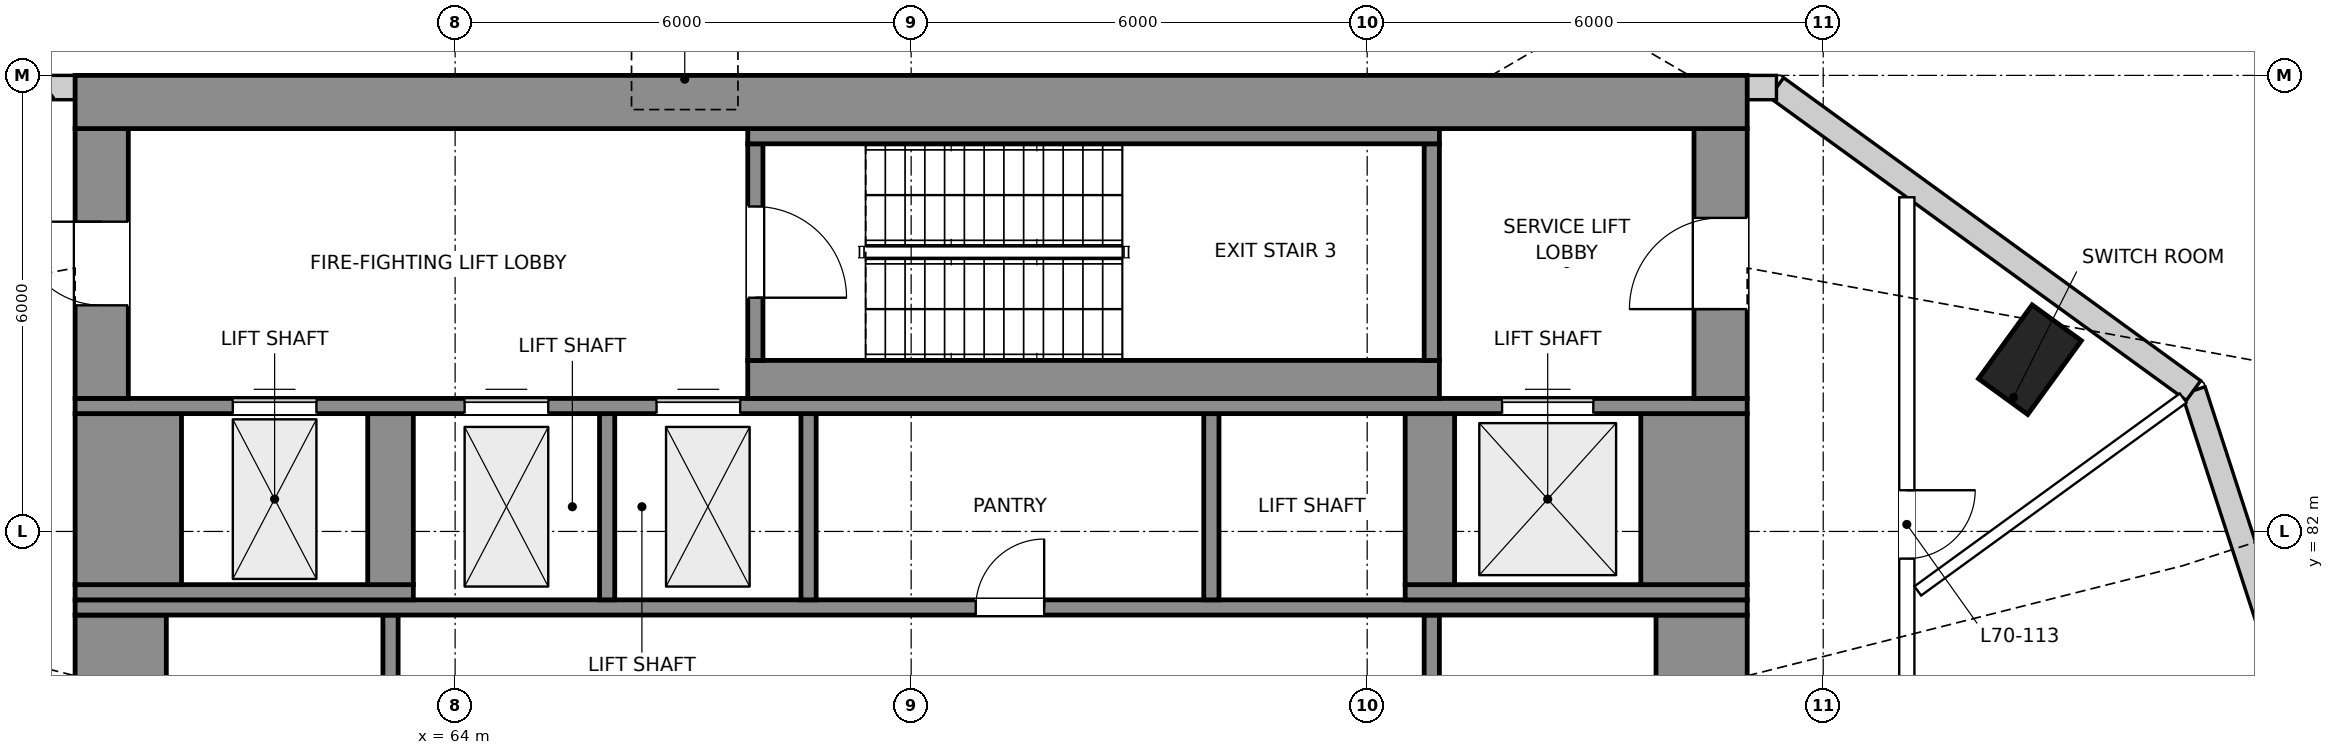
"""IFC4 building model, lengths in metres.
Left out: names, types, materials, properties, quantities, classifications, styles, units other than length and angle.
Written with IfcOpenShell. Run it as: python <this file> out.ifc"""

import sys

from ifc_helpers import new_model, si_unit, direction, frame, frame_2d, origin, origin_2d, place, context, subcontext, project, spatial, rectangle, extrude, element, fill, save


model = new_model("IFC4")
c1 = context("Model", 3, precision=1e-05, world=origin(), true_north=direction((0.0, 1.0)))
c2 = subcontext(c1, "Body", "Model", "MODEL_VIEW")
j1 = project(units=[si_unit("LENGTHUNIT", "METRE"), si_unit("PLANEANGLEUNIT", "RADIAN")], contexts=[c1])
p1 = place(None, origin())
s1 = spatial("IfcSite", under=j1, at=p1, CompositionType="ELEMENT")
p2 = place(p1, origin())
s2 = spatial("IfcBuilding", under=s1, at=p2, CompositionType="ELEMENT")
p3 = place(p2, frame((0.0, 0.0, 295.1)))
s3 = spatial("IfcBuildingStorey", under=s2, at=p3, CompositionType="ELEMENT", Elevation=295.1)
p4 = place(p3, frame((84.72, 84.26, 0.0), z_axis=(0.0, 0.0, 1.0), x_axis=(0.80902725304, -0.587771132193, 0.0)))
e1 = element("IfcColumn", 1, at=p4, inside=s3, PredefinedType="COLUMN", context=c2, shape_type="SweptSolid", body=[
    extrude(rectangle(XDim=0.8, YDim=1.2, at=origin_2d()), origin(), (0.0, 0.0, 1.0), 5.0),
])
p5 = place(p3, frame((92.529, 66.443, 0.0), z_axis=(0.0, 0.0, 1.0), x_axis=(-0.30902093442, 0.951055236088, 0.0)))
e2 = element("IfcWall", 2, at=p5, inside=s3, PredefinedType="SOLIDWALL", context=c2, shape_type="SweptSolid", body=[
    extrude(rectangle(XDim=18.306, YDim=0.32, at=frame_2d((9.153, 0.0))), origin(), (0.0, 0.0, 1.0), 4.6),
])
p6 = place(p3, frame((86.872, 83.854, 0.0), z_axis=(0.0, 0.0, 1.0), x_axis=(-0.809017735842, 0.587784231749, 0.0)))
e3 = element("IfcWall", 3, at=p6, inside=s3, PredefinedType="SOLIDWALL", context=c2, shape_type="SweptSolid", body=[
    extrude(rectangle(XDim=6.782, YDim=0.32, at=frame_2d((3.391, 0.0))), origin(), (0.0, 0.0, 1.0), 4.6),
])
for number, where, z_axis, x_axis in (
    (4, (81.385, 87.84, 0.0), (0.0, 0.0, 1.0), (-1.0, 0.0, 0.0)),
    (5, (59.0, 87.84, 0.0), (0.0, 0.0, 1.0), (-1.0, 0.0, 0.0)),
):
    element("IfcWall", number, at=place(p3, frame(where, z_axis=z_axis, x_axis=x_axis)), inside=s3, PredefinedType="SOLIDWALL", context=c2, shape_type="SweptSolid", body=[
        extrude(rectangle(XDim=0.385, YDim=0.32, at=frame_2d((0.192, 0.0))), origin(), (0.0, 0.0, 1.0), 4.6),
    ])
p7 = place(p3, frame((58.615, 87.84, 0.0), z_axis=(0.0, 0.0, 1.0), x_axis=(-0.809017735842, -0.587784231749, 0.0)))
e6 = element("IfcWall", 6, at=p7, inside=s3, PredefinedType="SOLIDWALL", context=c2, shape_type="SweptSolid", body=[
    extrude(rectangle(XDim=6.782, YDim=0.32, at=frame_2d((3.391, 0.0))), origin(), (0.0, 0.0, 1.0), 4.6),
])
for number, where, z_axis, x_axis in (
    (7, (59.6, 71.7, 0.0), (0.0, 0.0, 1.0), (0.0, 1.0, 0.0)),
    (8, (80.4, 71.7, 0.0), (0.0, 0.0, 1.0), (0.0, 1.0, 0.0)),
):
    element("IfcWall", number, at=place(p3, frame(where, z_axis=z_axis, x_axis=x_axis)), inside=s3, PredefinedType="SHEAR", context=c2, shape_type="SweptSolid", body=[
        extrude(rectangle(XDim=9.2, YDim=1.2, at=frame_2d((4.6, 0.0))), origin(), (0.0, 0.0, 1.0), 5.0),
    ])
for number, where, z_axis, x_axis in (
    (9, (63.15, 77.7, 0.0), (0.0, 0.0, 1.0), (0.0, 1.0, 0.0)),
    (10, (76.85, 77.7, 0.0), (0.0, 0.0, 1.0), (0.0, 1.0, 0.0)),
):
    element("IfcWall", number, at=place(p3, frame(where, z_axis=z_axis, x_axis=x_axis)), inside=s3, PredefinedType="SHEAR", context=c2, shape_type="SweptSolid", body=[
        extrude(rectangle(XDim=3.2, YDim=0.2, at=frame_2d((1.6, 0.0))), origin(), (0.0, 0.0, 1.0), 5.0),
    ])
p8 = place(p3, frame((59.0, 81.0, 0.0), z_axis=(0.0, 0.0, 1.0), x_axis=(1.0, 0.0, 0.0)))
e11 = element("IfcWall", 11, at=p8, inside=s3, PredefinedType="SHEAR", context=c2, shape_type="SweptSolid", body=[
    extrude(rectangle(XDim=22.0, YDim=0.2, at=frame_2d((11.0, 0.0))), origin(), (0.0, 0.0, 1.0), 5.0),
])
p9 = place(p8, frame((11.85, 0.0, 0.0)))
e12 = element("IfcOpeningElement", 12, at=p9, cuts=e11, PredefinedType="OPENING", context=c2, shape_type="SweptSolid", body=[
    extrude(rectangle(XDim=0.9, YDim=2.1, at=frame_2d((0.45, 1.05))), frame((0.0, 0.11, 0.0), z_axis=(0.0, -1.0, 0.0), x_axis=(1.0, 0.0, 0.0)), (0.0, 0.0, 1.0), 0.22),
])
p10 = place(p3, frame((59.0, 81.2, 0.0), z_axis=(0.0, 0.0, 1.0), x_axis=(1.0, 0.0, 0.0)))
e13 = element("IfcWall", 13, at=p10, inside=s3, PredefinedType="SHEAR", context=c2, shape_type="SweptSolid", body=[
    extrude(rectangle(XDim=4.45, YDim=0.2, at=frame_2d((2.225, 0.0))), origin(), (0.0, 0.0, 1.0), 5.0),
])
for number, where, z_axis, x_axis in (
    (14, (66.0, 81.1, 0.0), (0.0, 0.0, 1.0), (0.0, 1.0, 0.0)),
    (15, (68.65, 81.1, 0.0), (0.0, 0.0, 1.0), (0.0, 1.0, 0.0)),
    (16, (73.95, 81.1, 0.0), (0.0, 0.0, 1.0), (0.0, 1.0, 0.0)),
):
    element("IfcWall", number, at=place(p3, frame(where, z_axis=z_axis, x_axis=x_axis)), inside=s3, PredefinedType="SHEAR", context=c2, shape_type="SweptSolid", body=[
        extrude(rectangle(XDim=2.45, YDim=0.2, at=frame_2d((1.225, 0.0))), origin(), (0.0, 0.0, 1.0), 5.0),
    ])
p11 = place(p3, frame((76.5, 81.2, 0.0), z_axis=(0.0, 0.0, 1.0), x_axis=(1.0, 0.0, 0.0)))
e17 = element("IfcWall", 17, at=p11, inside=s3, PredefinedType="SHEAR", context=c2, shape_type="SweptSolid", body=[
    extrude(rectangle(XDim=4.5, YDim=0.2, at=frame_2d((2.25, 0.0))), origin(), (0.0, 0.0, 1.0), 5.0),
])
p12 = place(p3, frame((59.7, 81.3, 0.0), z_axis=(0.0, 0.0, 1.0), x_axis=(0.0, 1.0, 0.0)))
e18 = element("IfcWall", 18, at=p12, inside=s3, PredefinedType="SHEAR", context=c2, shape_type="SweptSolid", body=[
    extrude(rectangle(XDim=2.25, YDim=1.4, at=frame_2d((1.125, 0.0))), origin(), (0.0, 0.0, 1.0), 5.0),
])
p13 = place(p3, frame((63.15, 81.3, 0.0), z_axis=(0.0, 0.0, 1.0), x_axis=(0.0, 1.0, 0.0)))
e19 = element("IfcWall", 19, at=p13, inside=s3, PredefinedType="SHEAR", context=c2, shape_type="SweptSolid", body=[
    extrude(rectangle(XDim=2.25, YDim=0.6, at=frame_2d((1.125, 0.0))), origin(), (0.0, 0.0, 1.0), 5.0),
])
p14 = place(p3, frame((76.825, 81.3, 0.0), z_axis=(0.0, 0.0, 1.0), x_axis=(0.0, 1.0, 0.0)))
e20 = element("IfcWall", 20, at=p14, inside=s3, PredefinedType="SHEAR", context=c2, shape_type="SweptSolid", body=[
    extrude(rectangle(XDim=2.25, YDim=0.65, at=frame_2d((1.125, 0.0))), origin(), (0.0, 0.0, 1.0), 5.0),
])
p15 = place(p3, frame((80.3, 81.3, 0.0), z_axis=(0.0, 0.0, 1.0), x_axis=(0.0, 1.0, 0.0)))
e21 = element("IfcWall", 21, at=p15, inside=s3, PredefinedType="SHEAR", context=c2, shape_type="SweptSolid", body=[
    extrude(rectangle(XDim=2.25, YDim=1.4, at=frame_2d((1.125, 0.0))), origin(), (0.0, 0.0, 1.0), 5.0),
])
p16 = place(p3, frame((59.0, 83.65, 0.0), z_axis=(0.0, 0.0, 1.0), x_axis=(1.0, 0.0, 0.0)))
e22 = element("IfcWall", 22, at=p16, inside=s3, PredefinedType="SHEAR", context=c2, shape_type="SweptSolid", body=[
    extrude(rectangle(XDim=22.0, YDim=0.2, at=frame_2d((11.0, 0.0))), origin(), (0.0, 0.0, 1.0), 5.0),
])
p17 = place(p16, frame((5.125, 0.0, 0.0)))
e23 = element("IfcOpeningElement", 23, at=p17, cuts=e22, PredefinedType="OPENING", context=c2, shape_type="SweptSolid", body=[
    extrude(rectangle(XDim=1.1, YDim=2.1, at=frame_2d((0.55, 1.05))), frame((0.0, 0.11, 0.0), z_axis=(0.0, -1.0, 0.0), x_axis=(1.0, 0.0, 0.0)), (0.0, 0.0, 1.0), 0.22),
])
p18 = place(p16, frame((7.65, 0.0, 0.0)))
e24 = element("IfcOpeningElement", 24, at=p18, cuts=e22, PredefinedType="OPENING", context=c2, shape_type="SweptSolid", body=[
    extrude(rectangle(XDim=1.1, YDim=2.1, at=frame_2d((0.55, 1.05))), frame((0.0, 0.11, 0.0), z_axis=(0.0, -1.0, 0.0), x_axis=(1.0, 0.0, 0.0)), (0.0, 0.0, 1.0), 0.22),
])
p19 = place(p16, frame((18.775, 0.0, 0.0)))
e25 = element("IfcOpeningElement", 25, at=p19, cuts=e22, PredefinedType="OPENING", context=c2, shape_type="SweptSolid", body=[
    extrude(rectangle(XDim=1.2, YDim=2.1, at=frame_2d((0.6, 1.05))), frame((0.0, 0.11, 0.0), z_axis=(0.0, -1.0, 0.0), x_axis=(1.0, 0.0, 0.0)), (0.0, 0.0, 1.0), 0.22),
])
p20 = place(p16, frame((2.075, 0.0, 0.0)))
e26 = element("IfcOpeningElement", 26, at=p20, cuts=e22, PredefinedType="OPENING", context=c2, shape_type="SweptSolid", body=[
    extrude(rectangle(XDim=1.1, YDim=2.1, at=frame_2d((0.55, 1.05))), frame((0.0, 0.11, 0.0), z_axis=(0.0, -1.0, 0.0), x_axis=(1.0, 0.0, 0.0)), (0.0, 0.0, 1.0), 0.22),
])
p21 = place(p3, frame((59.35, 83.75, 0.0), z_axis=(0.0, 0.0, 1.0), x_axis=(0.0, 1.0, 0.0)))
e27 = element("IfcWall", 27, at=p21, inside=s3, PredefinedType="SHEAR", context=c2, shape_type="SweptSolid", body=[
    extrude(rectangle(XDim=3.55, YDim=0.7, at=frame_2d((1.775, 0.0))), origin(), (0.0, 0.0, 1.0), 5.0),
])
p22 = place(p21, frame((1.225, 0.0, 0.0)))
e28 = element("IfcOpeningElement", 28, at=p22, cuts=e27, PredefinedType="OPENING", context=c2, shape_type="SweptSolid", body=[
    extrude(rectangle(XDim=1.1, YDim=2.1, at=frame_2d((0.55, 1.05))), frame((0.0, 0.36, 0.0), z_axis=(0.0, -1.0, 0.0), x_axis=(1.0, 0.0, 0.0)), (0.0, 0.0, 1.0), 0.72),
])
p23 = place(p3, frame((67.85, 84.0, 0.0), z_axis=(0.0, 0.0, 1.0), x_axis=(1.0, 0.0, 0.0)))
e29 = element("IfcWall", 29, at=p23, inside=s3, PredefinedType="SHEAR", context=c2, shape_type="SweptSolid", body=[
    extrude(rectangle(XDim=9.1, YDim=0.5, at=frame_2d((4.55, 0.0))), origin(), (0.0, 0.0, 1.0), 5.0),
])
p24 = place(p3, frame((80.65, 83.75, 0.0), z_axis=(0.0, 0.0, 1.0), x_axis=(0.0, 1.0, 0.0)))
e30 = element("IfcWall", 30, at=p24, inside=s3, PredefinedType="SHEAR", context=c2, shape_type="SweptSolid", body=[
    extrude(rectangle(XDim=3.55, YDim=0.7, at=frame_2d((1.775, 0.0))), origin(), (0.0, 0.0, 1.0), 5.0),
])
p25 = place(p24, frame((1.175, 0.0, 0.0)))
e31 = element("IfcOpeningElement", 31, at=p25, cuts=e30, PredefinedType="OPENING", context=c2, shape_type="SweptSolid", body=[
    extrude(rectangle(XDim=1.2, YDim=2.1, at=frame_2d((0.6, 1.05))), frame((0.0, 0.36, 0.0), z_axis=(0.0, -1.0, 0.0), x_axis=(1.0, 0.0, 0.0)), (0.0, 0.0, 1.0), 0.72),
])
p26 = place(p3, frame((67.95, 84.25, 0.0), z_axis=(0.0, 0.0, 1.0), x_axis=(0.0, 1.0, 0.0)))
e32 = element("IfcWall", 32, at=p26, inside=s3, PredefinedType="SHEAR", context=c2, shape_type="SweptSolid", body=[
    extrude(rectangle(XDim=2.85, YDim=0.2, at=frame_2d((1.425, 0.0))), origin(), (0.0, 0.0, 1.0), 5.0),
])
p27 = place(p26, frame((0.825, 0.0, 0.0)))
e33 = element("IfcOpeningElement", 33, at=p27, cuts=e32, PredefinedType="OPENING", context=c2, shape_type="SweptSolid", body=[
    extrude(rectangle(XDim=1.2, YDim=2.1, at=frame_2d((0.6, 1.05))), frame((0.0, 0.11, 0.0), z_axis=(0.0, -1.0, 0.0), x_axis=(1.0, 0.0, 0.0)), (0.0, 0.0, 1.0), 0.22),
])
p28 = place(p3, frame((76.85, 84.25, 0.0), z_axis=(0.0, 0.0, 1.0), x_axis=(0.0, 1.0, 0.0)))
e34 = element("IfcWall", 34, at=p28, inside=s3, PredefinedType="SHEAR", context=c2, shape_type="SweptSolid", body=[
    extrude(rectangle(XDim=2.85, YDim=0.2, at=frame_2d((1.425, 0.0))), origin(), (0.0, 0.0, 1.0), 5.0),
])
p29 = place(p3, frame((67.85, 87.2, 0.0), z_axis=(0.0, 0.0, 1.0), x_axis=(1.0, 0.0, 0.0)))
e35 = element("IfcWall", 35, at=p29, inside=s3, PredefinedType="SHEAR", context=c2, shape_type="SweptSolid", body=[
    extrude(rectangle(XDim=9.1, YDim=0.2, at=frame_2d((4.55, 0.0))), origin(), (0.0, 0.0, 1.0), 5.0),
])
p30 = place(p3, frame((59.0, 87.65, 0.0), z_axis=(0.0, 0.0, 1.0), x_axis=(1.0, 0.0, 0.0)))
e36 = element("IfcWall", 36, at=p30, inside=s3, PredefinedType="SHEAR", context=c2, shape_type="SweptSolid", body=[
    extrude(rectangle(XDim=22.0, YDim=0.7, at=frame_2d((11.0, 0.0))), origin(), (0.0, 0.0, 1.0), 5.0),
])
p31 = place(p3, frame((83.1, 86.396, 0.0), z_axis=(0.0, 0.0, 1.0), x_axis=(0.0, -1.0, 0.0)))
e37 = element("IfcWall", 37, at=p31, inside=s3, PredefinedType="PARTITIONING", context=c2, shape_type="SweptSolid", body=[
    extrude(rectangle(XDim=14.347, YDim=0.2, at=frame_2d((7.173, 0.0))), origin(), (0.0, 0.0, 1.0), 4.15),
])
p32 = place(p31, frame((3.854, 0.0, 0.0)))
e38 = element("IfcOpeningElement", 38, at=p32, cuts=e37, PredefinedType="OPENING", context=c2, shape_type="SweptSolid", body=[
    extrude(rectangle(XDim=0.9, YDim=2.1, at=frame_2d((0.45, 1.05))), frame((0.0, 0.11, 0.0), z_axis=(0.0, -1.0, 0.0), x_axis=(1.0, 0.0, 0.0)), (0.0, 0.0, 1.0), 0.22),
])
p33 = place(p31, frame((7.751, 0.0, 0.0)))
e39 = element("IfcOpeningElement", 39, at=p33, cuts=e37, PredefinedType="OPENING", context=c2, shape_type="SweptSolid", body=[
    extrude(rectangle(XDim=0.9, YDim=2.1, at=frame_2d((0.45, 1.05))), frame((0.0, 0.11, 0.0), z_axis=(0.0, -1.0, 0.0), x_axis=(1.0, 0.0, 0.0)), (0.0, 0.0, 1.0), 0.22),
])
p34 = place(p31, frame((11.795, 0.0, 0.0)))
e40 = element("IfcOpeningElement", 40, at=p34, cuts=e37, PredefinedType="OPENING", context=c2, shape_type="SweptSolid", body=[
    extrude(rectangle(XDim=0.9, YDim=2.1, at=frame_2d((0.45, 1.05))), frame((0.0, 0.11, 0.0), z_axis=(0.0, -1.0, 0.0), x_axis=(1.0, 0.0, 0.0)), (0.0, 0.0, 1.0), 0.22),
])
p35 = place(p3, frame((86.736, 83.754, 0.0), z_axis=(0.0, 0.0, 1.0), x_axis=(-0.809036838554, -0.587757938154, 0.0)))
e41 = element("IfcWall", 41, at=p35, inside=s3, PredefinedType="PARTITIONING", context=c2, shape_type="SweptSolid", body=[
    extrude(rectangle(XDim=4.316, YDim=0.15, at=frame_2d((2.158, 0.0))), origin(), (0.0, 0.0, 1.0), 4.6),
])
p36 = place(p27, frame((1.2, 0.0, 0.0), z_axis=(0.0, 0.0, 1.0), x_axis=(-1.0, 0.0, 0.0)))
e42 = element("IfcDoor", 42, at=p36, inside=s3, OperationType="SINGLE_SWING_RIGHT", PredefinedType="DOOR", context=c2, shape_type="SweptSolid", body=[
    extrude(rectangle(XDim=1.2, YDim=2.1, at=frame_2d((0.6, 1.05))), frame((0.0, 0.025, 0.0), z_axis=(0.0, -1.0, 0.0), x_axis=(1.0, 0.0, 0.0)), (0.0, 0.0, 1.0), 0.05),
])
fill(e33, e42)
p37 = place(p22, origin())
e43 = element("IfcDoor", 43, at=p37, inside=s3, OperationType="SINGLE_SWING_RIGHT", PredefinedType="DOOR", context=c2, shape_type="SweptSolid", body=[
    extrude(rectangle(XDim=1.1, YDim=2.1, at=frame_2d((0.55, 1.05))), frame((0.0, 0.025, 0.0), z_axis=(0.0, -1.0, 0.0), x_axis=(1.0, 0.0, 0.0)), (0.0, 0.0, 1.0), 0.05),
])
fill(e28, e43)
p38 = place(p25, origin())
e44 = element("IfcDoor", 44, at=p38, inside=s3, OperationType="SINGLE_SWING_LEFT", PredefinedType="DOOR", context=c2, shape_type="SweptSolid", body=[
    extrude(rectangle(XDim=1.2, YDim=2.1, at=frame_2d((0.6, 1.05))), frame((0.0, 0.025, 0.0), z_axis=(0.0, -1.0, 0.0), x_axis=(1.0, 0.0, 0.0)), (0.0, 0.0, 1.0), 0.05),
])
fill(e31, e44)
p39 = place(p17, origin())
e45 = element("IfcDoor", 45, at=p39, inside=s3, OperationType="DOUBLE_DOOR_SLIDING", PredefinedType="DOOR", context=c2, shape_type="SweptSolid", body=[
    extrude(rectangle(XDim=1.1, YDim=2.1, at=frame_2d((0.55, 1.05))), frame((0.0, 0.025, 0.0), z_axis=(0.0, -1.0, 0.0), x_axis=(1.0, 0.0, 0.0)), (0.0, 0.0, 1.0), 0.05),
])
fill(e23, e45)
p40 = place(p18, origin())
e46 = element("IfcDoor", 46, at=p40, inside=s3, OperationType="DOUBLE_DOOR_SLIDING", PredefinedType="DOOR", context=c2, shape_type="SweptSolid", body=[
    extrude(rectangle(XDim=1.1, YDim=2.1, at=frame_2d((0.55, 1.05))), frame((0.0, 0.025, 0.0), z_axis=(0.0, -1.0, 0.0), x_axis=(1.0, 0.0, 0.0)), (0.0, 0.0, 1.0), 0.05),
])
fill(e24, e46)
p41 = place(p19, origin())
e47 = element("IfcDoor", 47, at=p41, inside=s3, OperationType="DOUBLE_DOOR_SLIDING", PredefinedType="DOOR", context=c2, shape_type="SweptSolid", body=[
    extrude(rectangle(XDim=1.2, YDim=2.1, at=frame_2d((0.6, 1.05))), frame((0.0, 0.025, 0.0), z_axis=(0.0, -1.0, 0.0), x_axis=(1.0, 0.0, 0.0)), (0.0, 0.0, 1.0), 0.05),
])
fill(e25, e47)
p42 = place(p20, origin())
e48 = element("IfcDoor", 48, at=p42, inside=s3, OperationType="DOUBLE_DOOR_SLIDING", PredefinedType="DOOR", context=c2, shape_type="SweptSolid", body=[
    extrude(rectangle(XDim=1.1, YDim=2.1, at=frame_2d((0.55, 1.05))), frame((0.0, 0.025, 0.0), z_axis=(0.0, -1.0, 0.0), x_axis=(1.0, 0.0, 0.0)), (0.0, 0.0, 1.0), 0.05),
])
fill(e26, e48)
p43 = place(p9, origin())
e49 = element("IfcDoor", 49, at=p43, inside=s3, OperationType="SINGLE_SWING_RIGHT", PredefinedType="DOOR", context=c2, shape_type="SweptSolid", body=[
    extrude(rectangle(XDim=0.9, YDim=2.1, at=frame_2d((0.45, 1.05))), frame((0.0, 0.025, 0.0), z_axis=(0.0, -1.0, 0.0), x_axis=(1.0, 0.0, 0.0)), (0.0, 0.0, 1.0), 0.05),
])
fill(e12, e49)
p44 = place(p32, origin())
e50 = element("IfcDoor", 50, at=p44, inside=s3, OperationType="SINGLE_SWING_LEFT", PredefinedType="DOOR", context=c2, shape_type="SweptSolid", body=[
    extrude(rectangle(XDim=0.9, YDim=2.1, at=frame_2d((0.45, 1.05))), frame((0.0, 0.025, 0.0), z_axis=(0.0, -1.0, 0.0), x_axis=(1.0, 0.0, 0.0)), (0.0, 0.0, 1.0), 0.05),
])
fill(e38, e50)
save(model, sys.argv[1])
